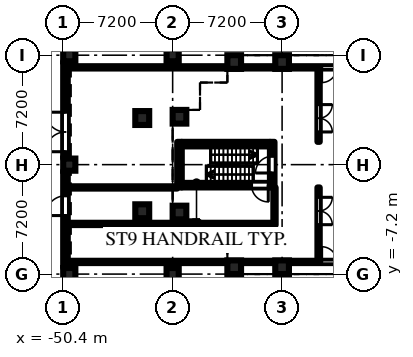
"""IFC4 building model, lengths in metres.
Left out: names, types, materials, properties, quantities, classifications, styles, units other than length and angle.
Written with IfcOpenShell. Run it as: python <this file> out.ifc"""

import sys

from ifc_helpers import new_model, si_unit, direction, frame, frame_2d, origin, origin_2d, place, context, subcontext, project, spatial, rectangle, hollow_circle, extrude, element, fill, save


model = new_model("IFC4")
c1 = context("Model", 3, precision=1e-05, world=origin(), true_north=direction((0.0, 1.0)))
c2 = subcontext(c1, "Body", "Model", "MODEL_VIEW")
j1 = project(units=[si_unit("LENGTHUNIT", "METRE"), si_unit("PLANEANGLEUNIT", "RADIAN")], contexts=[c1])
p1 = place(None, origin())
s1 = spatial("IfcSite", under=j1, at=p1, CompositionType="ELEMENT")
p2 = place(p1, origin())
s2 = spatial("IfcBuilding", under=s1, at=p2, CompositionType="ELEMENT")
p3 = place(p2, origin())
s3 = spatial("IfcBuildingStorey", under=s2, at=p3, CompositionType="ELEMENT", Elevation=0.0)
for number, where, z_axis, x_axis in (
    (1, (-42.75, -3.15, 0.0), (0.0, 0.0, 1.0), (1.0, 0.0, 0.0)),
    (2, (-42.75, 3.15, 0.0), (0.0, 0.0, 1.0), (1.0, 0.0, 0.0)),
    (3, (-39.15, -6.75, 0.0), (0.0, 0.0, 1.0), (1.0, 0.0, 0.0)),
    (4, (-39.15, 6.75, 0.0), (0.0, 0.0, 1.0), (1.0, 0.0, 0.0)),
    (5, (-36.0, -6.75, 0.0), (0.0, 0.0, 1.0), (1.0, 0.0, 0.0)),
    (6, (-36.0, 6.75, 0.0), (0.0, 0.0, 1.0), (1.0, 0.0, 0.0)),
):
    element("IfcColumn", number, at=place(p3, frame(where, z_axis=z_axis, x_axis=x_axis)), inside=s3, PredefinedType="COLUMN", context=c2, shape_type="SweptSolid", body=[
        extrude(rectangle(XDim=0.9, YDim=0.9, at=origin_2d()), origin(), (0.0, 0.0, 1.0), 7.2),
    ])
for number, where, z_axis, x_axis in (
    (7, (-50.0, -7.2, 0.0), (0.0, 0.0, 1.0), (1.0, 0.0, 0.0)),
    (8, (-50.0, 0.0, 0.0), (0.0, 0.0, 1.0), (1.0, 0.0, 0.0)),
    (9, (-50.0, 7.2, 0.0), (0.0, 0.0, 1.0), (1.0, 0.0, 0.0)),
    (10, (-43.2, -7.2, 0.0), (0.0, 0.0, 1.0), (1.0, 0.0, 0.0)),
    (11, (-43.2, 7.2, 0.0), (0.0, 0.0, 1.0), (1.0, 0.0, 0.0)),
):
    element("IfcColumn", number, at=place(p3, frame(where, z_axis=z_axis, x_axis=x_axis)), inside=s3, PredefinedType="COLUMN", context=c2, shape_type="SweptSolid", body=[
        extrude(rectangle(XDim=0.8, YDim=0.8, at=origin_2d()), origin(), (0.0, 0.0, 1.0), 6.6),
    ])
for number, where, z_axis, x_axis in (
    (12, (-45.2, 3.067, 0.0), (0.0, 0.0, 1.0), (1.0, 0.0, 0.0)),
    (13, (-45.2, -3.067, 0.0), (0.0, 0.0, 1.0), (1.0, 0.0, 0.0)),
):
    element("IfcColumn", number, at=place(p3, frame(where, z_axis=z_axis, x_axis=x_axis)), inside=s3, PredefinedType="COLUMN", context=c2, shape_type="SweptSolid", body=[
        extrude(hollow_circle(Radius=0.457, WallThickness=0.05, at=origin_2d()), origin(), (0.0, 0.0, 1.0), 7.5),
    ])
p4 = place(p3, frame((-50.25, 6.8, 0.0), z_axis=(0.0, 0.0, 1.0), x_axis=(0.0, -1.0, 0.0)))
e14 = element("IfcWall", 14, at=p4, inside=s3, PredefinedType="SOLIDWALL", context=c2, shape_type="SweptSolid", body=[
    extrude(rectangle(XDim=6.4, YDim=0.3, at=frame_2d((3.2, 0.0))), origin(), (0.0, 0.0, 1.0), 6.6),
])
p5 = place(p4, frame((3.35, 0.0, 0.0)))
e15 = element("IfcOpeningElement", 15, at=p5, cuts=e14, PredefinedType="OPENING", context=c2, shape_type="SweptSolid", body=[
    extrude(rectangle(XDim=2.6, YDim=2.4, at=frame_2d((1.3, 1.2))), frame((0.0, 0.16, 0.0), z_axis=(0.0, -1.0, 0.0), x_axis=(1.0, 0.0, 0.0)), (0.0, 0.0, 1.0), 0.32),
])
p6 = place(p3, frame((-50.25, -0.4, 0.0), z_axis=(0.0, 0.0, 1.0), x_axis=(0.0, -1.0, 0.0)))
e16 = element("IfcWall", 16, at=p6, inside=s3, PredefinedType="SOLIDWALL", context=c2, shape_type="SweptSolid", body=[
    extrude(rectangle(XDim=6.4, YDim=0.3, at=frame_2d((3.2, 0.0))), origin(), (0.0, 0.0, 1.0), 6.6),
])
p7 = place(p6, frame((1.65, 0.0, 0.0)))
e17 = element("IfcOpeningElement", 17, at=p7, cuts=e16, PredefinedType="OPENING", context=c2, shape_type="SweptSolid", body=[
    extrude(rectangle(XDim=1.3, YDim=2.1, at=frame_2d((0.65, 1.05))), frame((0.0, 0.16, 0.0), z_axis=(0.0, -1.0, 0.0), x_axis=(1.0, 0.0, 0.0)), (0.0, 0.0, 1.0), 0.32),
])
p8 = place(p3, frame((-36.65, -1.5, 0.0), z_axis=(0.0, 0.0, 1.0), x_axis=(0.0, 1.0, 0.0)))
e18 = element("IfcWall", 18, at=p8, inside=s3, PredefinedType="SHEAR", context=c2, shape_type="SweptSolid", body=[
    extrude(rectangle(XDim=3.0, YDim=0.3, at=frame_2d((1.5, 0.0))), origin(), (0.0, 0.0, 1.0), 6.6),
])
p9 = place(p8, frame((0.95, 0.0, 0.0)))
e19 = element("IfcOpeningElement", 19, at=p9, cuts=e18, PredefinedType="OPENING", context=c2, shape_type="SweptSolid", body=[
    extrude(rectangle(XDim=1.1, YDim=2.1, at=frame_2d((0.55, 1.05))), frame((0.0, 0.16, 0.0), z_axis=(0.0, -1.0, 0.0), x_axis=(1.0, 0.0, 0.0)), (0.0, 0.0, 1.0), 0.32),
])
p10 = place(p3, frame((-42.75, -1.5, 0.0), z_axis=(0.0, 0.0, 1.0), x_axis=(0.0, 1.0, 0.0)))
e20 = element("IfcWall", 20, at=p10, inside=s3, PredefinedType="SHEAR", context=c2, shape_type="SweptSolid", body=[
    extrude(rectangle(XDim=3.0, YDim=0.3, at=frame_2d((1.5, 0.0))), origin(), (0.0, 0.0, 1.0), 6.6),
])
p11 = place(p3, frame((-36.8, -1.35, 0.0), z_axis=(0.0, 0.0, 1.0), x_axis=(-1.0, 0.0, 0.0)))
e21 = element("IfcWall", 21, at=p11, inside=s3, PredefinedType="SHEAR", context=c2, shape_type="SweptSolid", body=[
    extrude(rectangle(XDim=5.8, YDim=0.3, at=frame_2d((2.9, 0.0))), origin(), (0.0, 0.0, 1.0), 6.6),
])
p12 = place(p11, frame((0.11, 0.0, 0.0)))
e22 = element("IfcOpeningElement", 22, at=p12, cuts=e21, PredefinedType="OPENING", context=c2, shape_type="SweptSolid", body=[
    extrude(rectangle(XDim=1.1, YDim=2.1, at=frame_2d((0.55, 1.05))), frame((0.0, 0.16, 0.0), z_axis=(0.0, -1.0, 0.0), x_axis=(1.0, 0.0, 0.0)), (0.0, 0.0, 1.0), 0.32),
])
p13 = place(p3, frame((-36.8, 1.35, 0.0), z_axis=(0.0, 0.0, 1.0), x_axis=(-1.0, 0.0, 0.0)))
e23 = element("IfcWall", 23, at=p13, inside=s3, PredefinedType="SHEAR", context=c2, shape_type="SweptSolid", body=[
    extrude(rectangle(XDim=5.8, YDim=0.3, at=frame_2d((2.9, 0.0))), origin(), (0.0, 0.0, 1.0), 6.6),
])
p14 = place(p3, frame((-50.22, -6.4, 0.0), z_axis=(0.0, 0.0, 1.0), x_axis=(1.0, 0.0, 0.0)))
e24 = element("IfcWall", 24, at=p14, inside=s3, PredefinedType="PARTITIONING", context=c2, shape_type="SweptSolid", body=[
    extrude(rectangle(XDim=28.62, YDim=0.15, at=frame_2d((14.31, 0.0))), origin(), (0.0, 0.0, 1.0), 6.6),
])
p15 = place(p14, frame((16.82, 0.0, 0.0)))
e25 = element("IfcOpeningElement", 25, at=p15, cuts=e24, PredefinedType="OPENING", context=c2, shape_type="SweptSolid", body=[
    extrude(rectangle(XDim=2.0, YDim=2.1, at=frame_2d((1.0, 1.05))), frame((0.0, 0.085, 0.0), z_axis=(0.0, -1.0, 0.0), x_axis=(1.0, 0.0, 0.0)), (0.0, 0.0, 1.0), 0.17),
])
p16 = place(p3, frame((-50.22, -3.9, 0.0), z_axis=(0.0, 0.0, 1.0), x_axis=(1.0, 0.0, 0.0)))
e26 = element("IfcWall", 26, at=p16, inside=s3, PredefinedType="PARTITIONING", context=c2, shape_type="SweptSolid", body=[
    extrude(rectangle(XDim=13.645, YDim=0.15, at=frame_2d((6.823, 0.0))), origin(), (0.0, 0.0, 1.0), 6.6),
])
p17 = place(p3, frame((-50.22, -1.5, 0.0), z_axis=(0.0, 0.0, 1.0), x_axis=(1.0, 0.0, 0.0)))
e27 = element("IfcWall", 27, at=p17, inside=s3, PredefinedType="PARTITIONING", context=c2, shape_type="SweptSolid", body=[
    extrude(rectangle(XDim=7.32, YDim=0.15, at=frame_2d((3.66, 0.0))), origin(), (0.0, 0.0, 1.0), 6.6),
])
p18 = place(p3, frame((-50.22, 6.4, 0.0), z_axis=(0.0, 0.0, 1.0), x_axis=(1.0, 0.0, 0.0)))
e28 = element("IfcWall", 28, at=p18, inside=s3, PredefinedType="PARTITIONING", context=c2, shape_type="SweptSolid", body=[
    extrude(rectangle(XDim=28.62, YDim=0.15, at=frame_2d((14.31, 0.0))), origin(), (0.0, 0.0, 1.0), 6.6),
])
p19 = place(p18, frame((16.82, 0.0, 0.0)))
e29 = element("IfcOpeningElement", 29, at=p19, cuts=e28, PredefinedType="OPENING", context=c2, shape_type="SweptSolid", body=[
    extrude(rectangle(XDim=2.0, YDim=2.1, at=frame_2d((1.0, 1.05))), frame((0.0, 0.085, 0.0), z_axis=(0.0, -1.0, 0.0), x_axis=(1.0, 0.0, 0.0)), (0.0, 0.0, 1.0), 0.17),
])
p20 = place(p3, frame((-36.5, -3.975, 0.0), z_axis=(0.0, 0.0, 1.0), x_axis=(0.0, 1.0, 0.0)))
e30 = element("IfcWall", 30, at=p20, inside=s3, PredefinedType="PARTITIONING", context=c2, shape_type="SweptSolid", body=[
    extrude(rectangle(XDim=2.475, YDim=0.15, at=frame_2d((1.238, 0.0))), origin(), (0.0, 0.0, 1.0), 6.6),
])
p21 = place(p3, frame((-33.6, -6.325, 0.0), z_axis=(0.0, 0.0, 1.0), x_axis=(0.0, 1.0, 0.0)))
e31 = element("IfcWall", 31, at=p21, inside=s3, PredefinedType="PARTITIONING", context=c2, shape_type="SweptSolid", body=[
    extrude(rectangle(XDim=4.825, YDim=0.15, at=frame_2d((2.413, 0.0))), origin(), (0.0, 0.0, 1.0), 6.6),
])
p22 = place(p21, frame((2.375, 0.0, 0.0)))
e32 = element("IfcOpeningElement", 32, at=p22, cuts=e31, PredefinedType="OPENING", context=c2, shape_type="SweptSolid", body=[
    extrude(rectangle(XDim=1.8, YDim=2.1, at=frame_2d((0.9, 1.05))), frame((0.0, 0.085, 0.0), z_axis=(0.0, -1.0, 0.0), x_axis=(1.0, 0.0, 0.0)), (0.0, 0.0, 1.0), 0.17),
])
p23 = place(p3, frame((-33.6, 1.5, 0.0), z_axis=(0.0, 0.0, 1.0), x_axis=(0.0, 1.0, 0.0)))
e33 = element("IfcWall", 33, at=p23, inside=s3, PredefinedType="PARTITIONING", context=c2, shape_type="SweptSolid", body=[
    extrude(rectangle(XDim=4.825, YDim=0.15, at=frame_2d((2.413, 0.0))), origin(), (0.0, 0.0, 1.0), 6.6),
])
p24 = place(p23, frame((0.65, 0.0, 0.0)))
e34 = element("IfcOpeningElement", 34, at=p24, cuts=e33, PredefinedType="OPENING", context=c2, shape_type="SweptSolid", body=[
    extrude(rectangle(XDim=1.8, YDim=2.1, at=frame_2d((0.9, 1.05))), frame((0.0, 0.085, 0.0), z_axis=(0.0, -1.0, 0.0), x_axis=(1.0, 0.0, 0.0)), (0.0, 0.0, 1.0), 0.17),
])
p25 = place(p5, frame((2.6, 0.0, 0.0), z_axis=(0.0, 0.0, 1.0), x_axis=(-1.0, 0.0, 0.0)))
e35 = element("IfcDoor", 35, at=p25, inside=s3, OperationType="DOUBLE_DOOR_DOUBLE_SWING", PredefinedType="DOOR", context=c2, shape_type="SweptSolid", body=[
    extrude(rectangle(XDim=2.6, YDim=2.4, at=frame_2d((1.3, 1.2))), frame((0.0, 0.025, 0.0), z_axis=(0.0, -1.0, 0.0), x_axis=(1.0, 0.0, 0.0)), (0.0, 0.0, 1.0), 0.05),
])
fill(e15, e35)
p26 = place(p7, frame((1.3, 0.0, 0.0), z_axis=(0.0, 0.0, 1.0), x_axis=(-1.0, 0.0, 0.0)))
e36 = element("IfcDoor", 36, at=p26, inside=s3, OperationType="SINGLE_SWING_LEFT", PredefinedType="DOOR", context=c2, shape_type="SweptSolid", body=[
    extrude(rectangle(XDim=1.3, YDim=2.1, at=frame_2d((0.65, 1.05))), frame((0.0, 0.025, 0.0), z_axis=(0.0, -1.0, 0.0), x_axis=(1.0, 0.0, 0.0)), (0.0, 0.0, 1.0), 0.05),
])
fill(e17, e36)
p27 = place(p9, origin())
e37 = element("IfcDoor", 37, at=p27, inside=s3, OperationType="SINGLE_SWING_LEFT", PredefinedType="DOOR", context=c2, shape_type="SweptSolid", body=[
    extrude(rectangle(XDim=1.1, YDim=2.1, at=frame_2d((0.55, 1.05))), frame((0.0, 0.025, 0.0), z_axis=(0.0, -1.0, 0.0), x_axis=(1.0, 0.0, 0.0)), (0.0, 0.0, 1.0), 0.05),
])
fill(e19, e37)
p28 = place(p12, origin())
e38 = element("IfcDoor", 38, at=p28, inside=s3, OperationType="SINGLE_SWING_LEFT", PredefinedType="DOOR", context=c2, shape_type="SweptSolid", body=[
    extrude(rectangle(XDim=1.1, YDim=2.1, at=frame_2d((0.55, 1.05))), frame((0.0, 0.025, 0.0), z_axis=(0.0, -1.0, 0.0), x_axis=(1.0, 0.0, 0.0)), (0.0, 0.0, 1.0), 0.05),
])
fill(e22, e38)
p29 = place(p24, frame((1.8, 0.0, 0.0), z_axis=(0.0, 0.0, 1.0), x_axis=(-1.0, 0.0, 0.0)))
e39 = element("IfcDoor", 39, at=p29, inside=s3, OperationType="DOUBLE_DOOR_DOUBLE_SWING", PredefinedType="DOOR", context=c2, shape_type="SweptSolid", body=[
    extrude(rectangle(XDim=1.8, YDim=2.1, at=frame_2d((0.9, 1.05))), frame((0.0, 0.025, 0.0), z_axis=(0.0, -1.0, 0.0), x_axis=(1.0, 0.0, 0.0)), (0.0, 0.0, 1.0), 0.05),
])
fill(e34, e39)
p30 = place(p19, frame((2.0, 0.0, 0.0), z_axis=(0.0, 0.0, 1.0), x_axis=(-1.0, 0.0, 0.0)))
e40 = element("IfcDoor", 40, at=p30, inside=s3, OperationType="DOUBLE_DOOR_DOUBLE_SWING", PredefinedType="DOOR", context=c2, shape_type="SweptSolid", body=[
    extrude(rectangle(XDim=2.0, YDim=2.1, at=frame_2d((1.0, 1.05))), frame((0.0, 0.025, 0.0), z_axis=(0.0, -1.0, 0.0), x_axis=(1.0, 0.0, 0.0)), (0.0, 0.0, 1.0), 0.05),
])
fill(e29, e40)
p31 = place(p22, frame((1.8, 0.0, 0.0), z_axis=(0.0, 0.0, 1.0), x_axis=(-1.0, 0.0, 0.0)))
e41 = element("IfcDoor", 41, at=p31, inside=s3, OperationType="DOUBLE_DOOR_DOUBLE_SWING", PredefinedType="DOOR", context=c2, shape_type="SweptSolid", body=[
    extrude(rectangle(XDim=1.8, YDim=2.1, at=frame_2d((0.9, 1.05))), frame((0.0, 0.025, 0.0), z_axis=(0.0, -1.0, 0.0), x_axis=(1.0, 0.0, 0.0)), (0.0, 0.0, 1.0), 0.05),
])
fill(e32, e41)
p32 = place(p15, origin())
e42 = element("IfcDoor", 42, at=p32, inside=s3, OperationType="DOUBLE_DOOR_DOUBLE_SWING", PredefinedType="DOOR", context=c2, shape_type="SweptSolid", body=[
    extrude(rectangle(XDim=2.0, YDim=2.1, at=frame_2d((1.0, 1.05))), frame((0.0, 0.025, 0.0), z_axis=(0.0, -1.0, 0.0), x_axis=(1.0, 0.0, 0.0)), (0.0, 0.0, 1.0), 0.05),
])
fill(e25, e42)
save(model, sys.argv[1])
